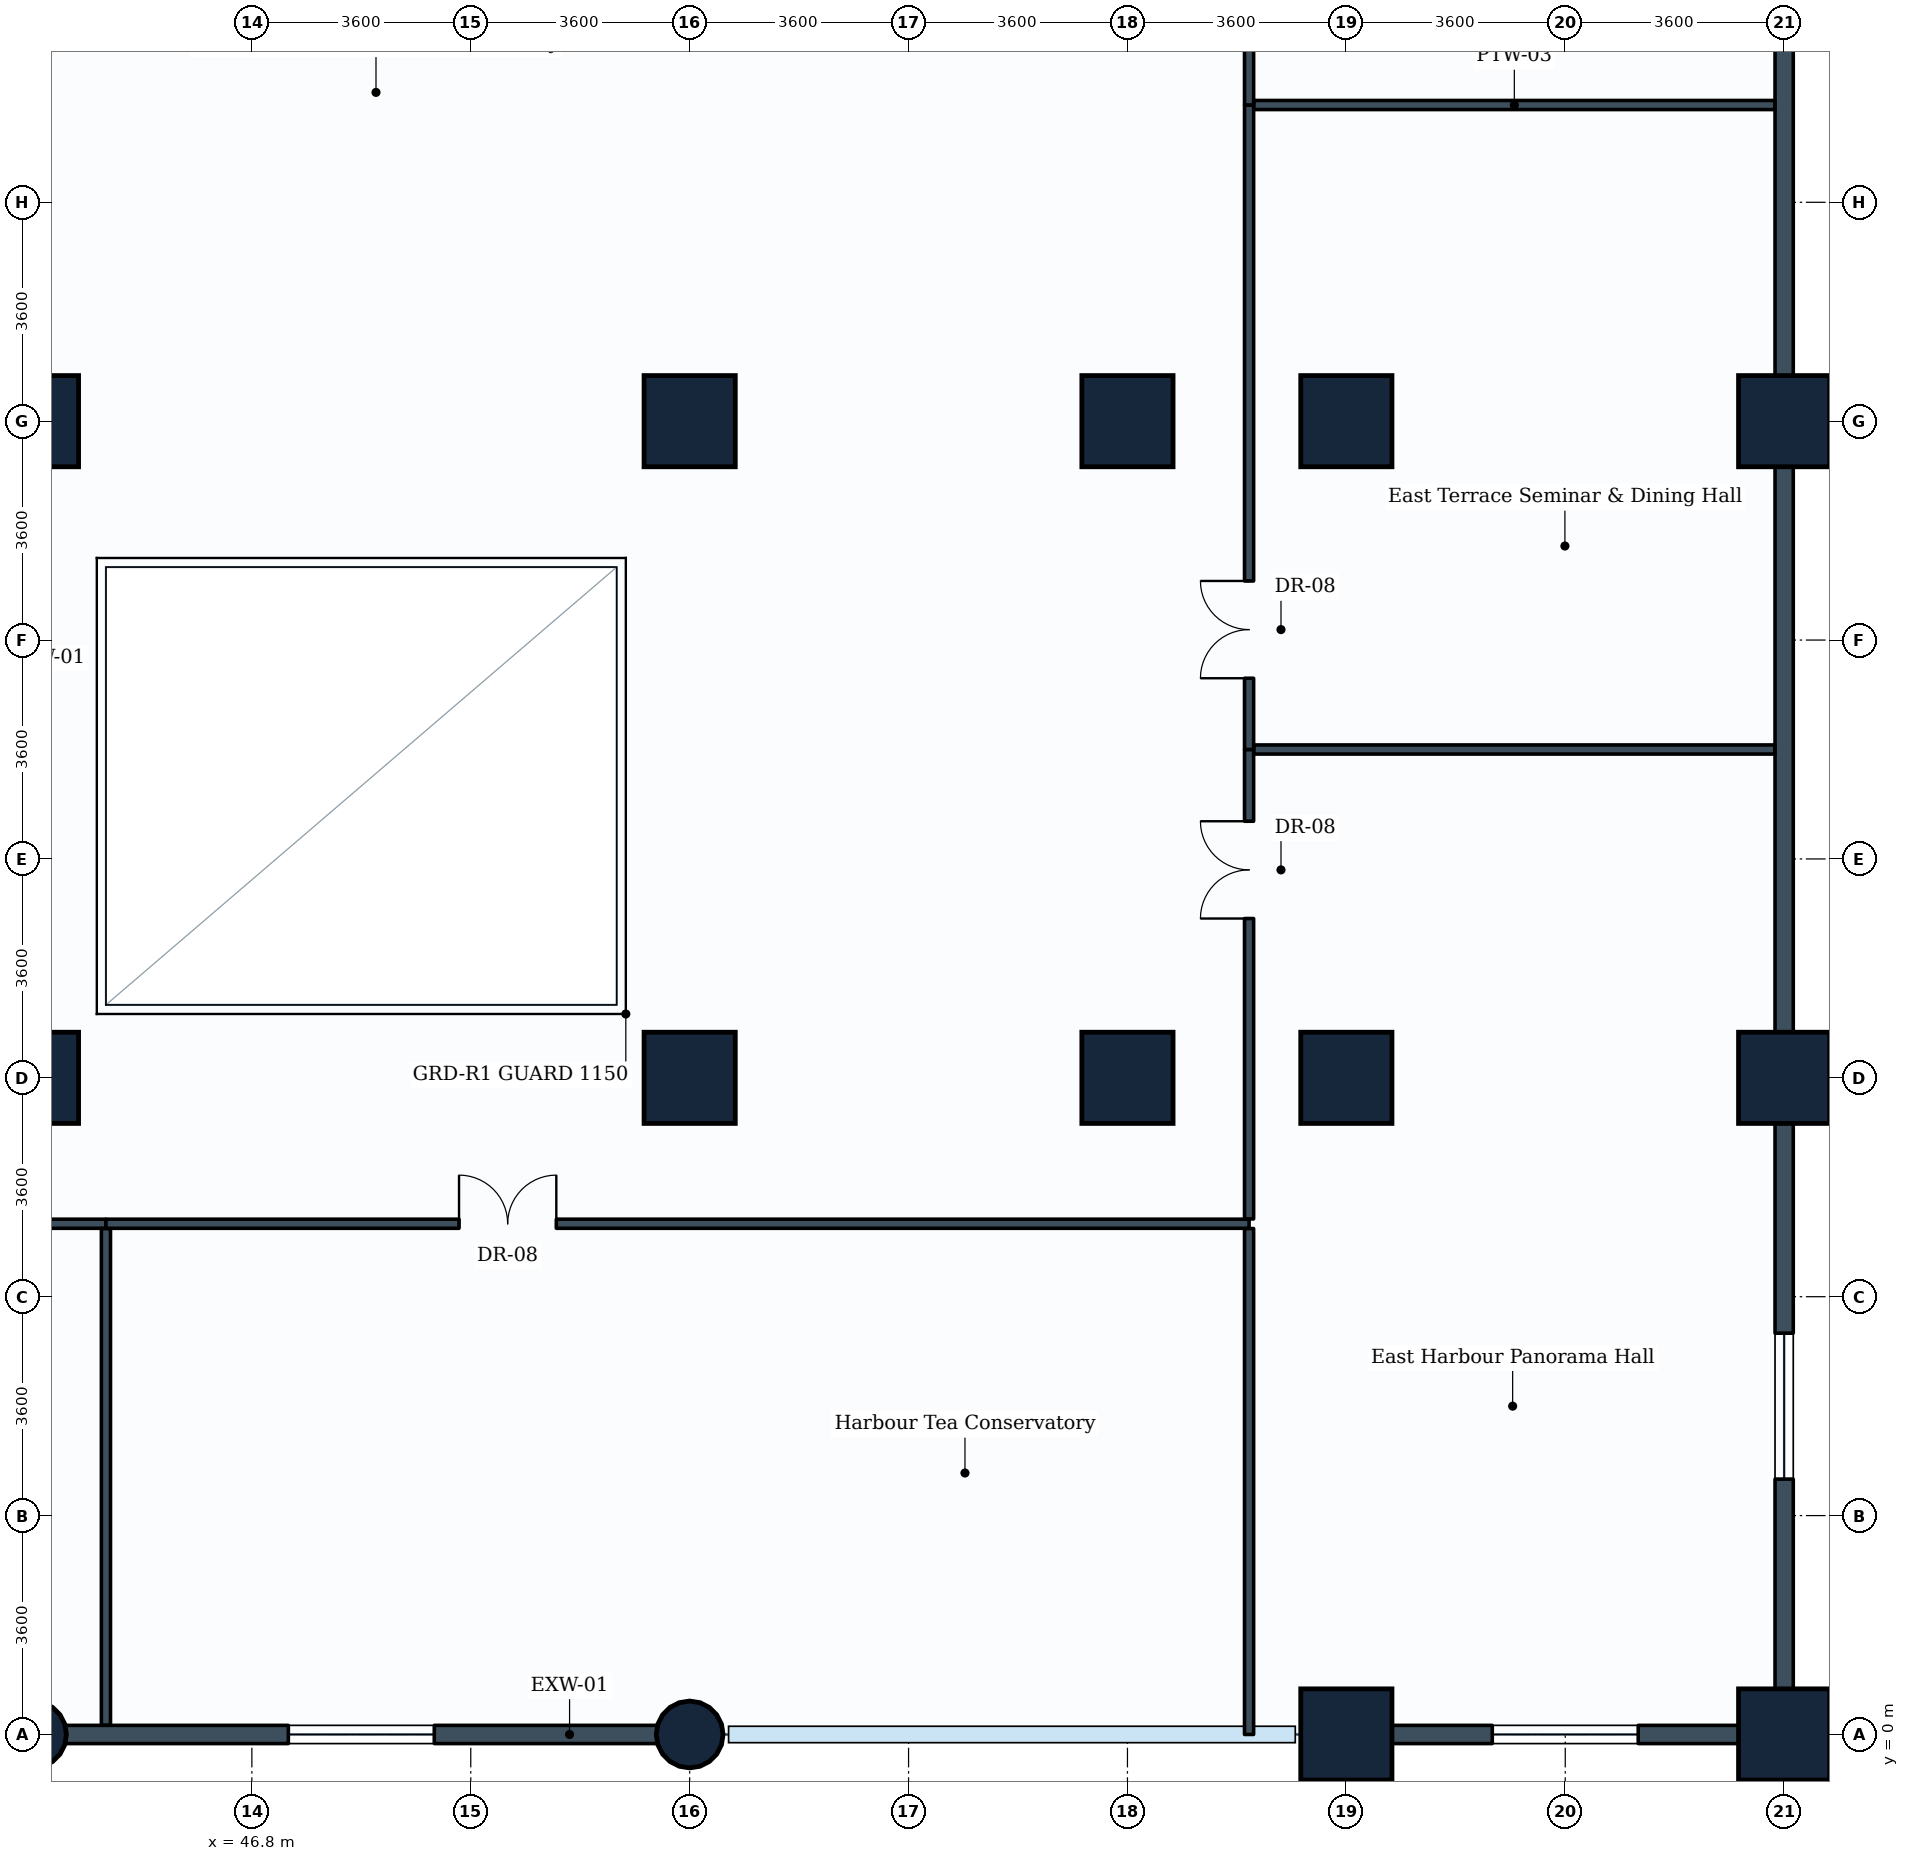
"""IFC4 building model, lengths in metres.
Left out: names, types, materials, properties, quantities, classifications, styles, units other than length and angle.
Written with IfcOpenShell. Run it as: python <this file> out.ifc"""

import sys

from ifc_helpers import new_model, si_unit, direction, frame, frame_2d, origin, origin_2d, place, context, subcontext, project, spatial, rectangle, circle, extrude, element, fill, save


model = new_model("IFC4")
c1 = context("Model", 3, precision=1e-05, world=origin(), true_north=direction((0.0, 1.0)))
c2 = subcontext(c1, "Body", "Model", "MODEL_VIEW")
j1 = project(units=[si_unit("LENGTHUNIT", "METRE"), si_unit("PLANEANGLEUNIT", "RADIAN")], contexts=[c1])
p1 = place(None, origin())
s1 = spatial("IfcSite", under=j1, at=p1, CompositionType="ELEMENT")
p2 = place(p1, origin())
s2 = spatial("IfcBuilding", under=s1, at=p2, CompositionType="ELEMENT")
p3 = place(p2, frame((0.0, 0.0, 10.2)))
s3 = spatial("IfcBuildingStorey", under=s2, at=p3, CompositionType="ELEMENT", Elevation=10.2)
p4 = place(p3, frame((43.2, 0.0, 0.0), z_axis=(0.0, 0.0, 1.0), x_axis=(1.0, 0.0, 0.0)))
e1 = element("IfcColumn", 1, at=p4, inside=s3, PredefinedType="COLUMN", context=c2, shape_type="SweptSolid", body=[
    extrude(circle(Radius=0.55, at=origin_2d()), origin(), (0.0, 0.0, 1.0), 4.6),
])
for number, where, z_axis, x_axis in (
    (2, (43.2, 10.8, 0.0), (0.0, 0.0, 1.0), (1.0, 0.0, 0.0)),
    (3, (43.2, 21.6, 0.0), (0.0, 0.0, 1.0), (1.0, 0.0, 0.0)),
):
    element("IfcColumn", number, at=place(p3, frame(where, z_axis=z_axis, x_axis=x_axis)), inside=s3, PredefinedType="COLUMN", context=c2, shape_type="SweptSolid", body=[
        extrude(rectangle(XDim=1.5, YDim=1.5, at=origin_2d()), origin(), (0.0, 0.0, 1.0), 4.6),
    ])
p5 = place(p3, frame((54.0, 0.0, 0.0), z_axis=(0.0, 0.0, 1.0), x_axis=(1.0, 0.0, 0.0)))
e4 = element("IfcColumn", 4, at=p5, inside=s3, PredefinedType="COLUMN", context=c2, shape_type="SweptSolid", body=[
    extrude(circle(Radius=0.55, at=origin_2d()), origin(), (0.0, 0.0, 1.0), 4.6),
])
for number, where, z_axis, x_axis in (
    (5, (54.0, 10.8, 0.0), (0.0, 0.0, 1.0), (1.0, 0.0, 0.0)),
    (6, (54.0, 21.6, 0.0), (0.0, 0.0, 1.0), (1.0, 0.0, 0.0)),
    (7, (61.2, 10.8, 0.0), (0.0, 0.0, 1.0), (1.0, 0.0, 0.0)),
    (8, (61.2, 21.6, 0.0), (0.0, 0.0, 1.0), (1.0, 0.0, 0.0)),
    (9, (64.8, 0.0, 0.0), (0.0, 0.0, 1.0), (1.0, 0.0, 0.0)),
    (10, (64.8, 10.8, 0.0), (0.0, 0.0, 1.0), (1.0, 0.0, 0.0)),
    (11, (64.8, 21.6, 0.0), (0.0, 0.0, 1.0), (1.0, 0.0, 0.0)),
    (12, (72.0, 0.0, 0.0), (0.0, 0.0, 1.0), (1.0, 0.0, 0.0)),
    (13, (72.0, 10.8, 0.0), (0.0, 0.0, 1.0), (1.0, 0.0, 0.0)),
    (14, (72.0, 21.6, 0.0), (0.0, 0.0, 1.0), (1.0, 0.0, 0.0)),
):
    element("IfcColumn", number, at=place(p3, frame(where, z_axis=z_axis, x_axis=x_axis)), inside=s3, PredefinedType="COLUMN", context=c2, shape_type="SweptSolid", body=[
        extrude(rectangle(XDim=1.5, YDim=1.5, at=origin_2d()), origin(), (0.0, 0.0, 1.0), 4.6),
    ])
p6 = place(p3, frame((54.0, 0.0, 0.0), z_axis=(0.0, 0.0, 1.0), x_axis=(-1.0, 0.0, 0.0)))
e15 = element("IfcWall", 15, at=p6, inside=s3, PredefinedType="STANDARD", context=c2, shape_type="SweptSolid", body=[
    extrude(rectangle(XDim=10.8, YDim=0.3, at=frame_2d((5.4, 0.0))), origin(), (0.0, 0.0, 1.0), 3.23),
])
p7 = place(p6, frame((4.2, 0.0, 0.85)))
e16 = element("IfcOpeningElement", 16, at=p7, cuts=e15, PredefinedType="OPENING", context=c2, shape_type="SweptSolid", body=[
    extrude(rectangle(XDim=2.4, YDim=1.6, at=frame_2d((1.2, 0.8))), frame((0.0, 0.16, 0.0), z_axis=(0.0, -1.0, 0.0), x_axis=(1.0, 0.0, 0.0)), (0.0, 0.0, 1.0), 0.32),
])
p8 = place(p3, frame((72.0, 0.0, 0.0), z_axis=(0.0, 0.0, 1.0), x_axis=(-1.0, 0.0, 0.0)))
e17 = element("IfcWall", 17, at=p8, inside=s3, PredefinedType="STANDARD", context=c2, shape_type="SweptSolid", body=[
    extrude(rectangle(XDim=7.2, YDim=0.3, at=frame_2d((3.6, 0.0))), origin(), (0.0, 0.0, 1.0), 3.23),
])
p9 = place(p8, frame((2.4, 0.0, 0.85)))
e18 = element("IfcOpeningElement", 18, at=p9, cuts=e17, PredefinedType="OPENING", context=c2, shape_type="SweptSolid", body=[
    extrude(rectangle(XDim=2.4, YDim=1.6, at=frame_2d((1.2, 0.8))), frame((0.0, 0.16, 0.0), z_axis=(0.0, -1.0, 0.0), x_axis=(1.0, 0.0, 0.0)), (0.0, 0.0, 1.0), 0.32),
])
p10 = place(p3, frame((72.0, 10.8, 0.0), z_axis=(0.0, 0.0, 1.0), x_axis=(0.0, -1.0, 0.0)))
e19 = element("IfcWall", 19, at=p10, inside=s3, PredefinedType="STANDARD", context=c2, shape_type="SweptSolid", body=[
    extrude(rectangle(XDim=10.8, YDim=0.3, at=frame_2d((5.4, 0.0))), origin(), (0.0, 0.0, 1.0), 3.23),
])
p11 = place(p10, frame((4.2, 0.0, 0.85)))
e20 = element("IfcOpeningElement", 20, at=p11, cuts=e19, PredefinedType="OPENING", context=c2, shape_type="SweptSolid", body=[
    extrude(rectangle(XDim=2.4, YDim=1.6, at=frame_2d((1.2, 0.8))), frame((0.0, 0.16, 0.0), z_axis=(0.0, -1.0, 0.0), x_axis=(1.0, 0.0, 0.0)), (0.0, 0.0, 1.0), 0.32),
])
p12 = place(p3, frame((72.0, 21.6, 0.0), z_axis=(0.0, 0.0, 1.0), x_axis=(0.0, -1.0, 0.0)))
e21 = element("IfcWall", 21, at=p12, inside=s3, PredefinedType="STANDARD", context=c2, shape_type="SweptSolid", body=[
    extrude(rectangle(XDim=10.8, YDim=0.3, at=frame_2d((5.4, 0.0))), origin(), (0.0, 0.0, 1.0), 3.63),
])
p13 = place(p3, frame((72.0, 32.4, 0.0), z_axis=(0.0, 0.0, 1.0), x_axis=(0.0, -1.0, 0.0)))
e22 = element("IfcWall", 22, at=p13, inside=s3, PredefinedType="STANDARD", context=c2, shape_type="SweptSolid", body=[
    extrude(rectangle(XDim=10.8, YDim=0.3, at=frame_2d((5.4, 0.0))), origin(), (0.0, 0.0, 1.0), 3.63),
])
p14 = place(p3, frame((26.4, 8.4, 0.0), z_axis=(0.0, 0.0, 1.0), x_axis=(1.0, 0.0, 0.0)))
e23 = element("IfcWall", 23, at=p14, inside=s3, PredefinedType="PARTITIONING", context=c2, shape_type="SweptSolid", body=[
    extrude(rectangle(XDim=18.0, YDim=0.15, at=frame_2d((9.0, 0.0))), origin(), (0.0, 0.0, 1.0), 3.23),
])
p15 = place(p14, frame((8.2, 0.0, 0.0)))
e24 = element("IfcOpeningElement", 24, at=p15, cuts=e23, PredefinedType="OPENING", context=c2, shape_type="SweptSolid", body=[
    extrude(rectangle(XDim=1.6, YDim=2.2, at=frame_2d((0.8, 1.1))), frame((0.0, 0.085, 0.0), z_axis=(0.0, -1.0, 0.0), x_axis=(1.0, 0.0, 0.0)), (0.0, 0.0, 1.0), 0.17),
])
p16 = place(p3, frame((44.4, 0.154, 0.0), z_axis=(0.0, 0.0, 1.0), x_axis=(0.0, 1.0, 0.0)))
e25 = element("IfcWall", 25, at=p16, inside=s3, PredefinedType="PARTITIONING", context=c2, shape_type="SweptSolid", body=[
    extrude(rectangle(XDim=8.167, YDim=0.15, at=frame_2d((4.083, 0.0))), origin(), (0.0, 0.0, 1.0), 4.285),
])
p17 = place(p3, frame((44.4, 8.4, 0.0), z_axis=(0.0, 0.0, 1.0), x_axis=(1.0, 0.0, 0.0)))
e26 = element("IfcWall", 26, at=p17, inside=s3, PredefinedType="PARTITIONING", context=c2, shape_type="SweptSolid", body=[
    extrude(rectangle(XDim=18.8, YDim=0.15, at=frame_2d((9.4, 0.0))), origin(), (0.0, 0.0, 1.0), 3.23),
])
p18 = place(p17, frame((5.807, 0.0, 0.0)))
e27 = element("IfcOpeningElement", 27, at=p18, cuts=e26, PredefinedType="OPENING", context=c2, shape_type="SweptSolid", body=[
    extrude(rectangle(XDim=1.6, YDim=2.2, at=frame_2d((0.8, 1.1))), frame((0.0, 0.085, 0.0), z_axis=(0.0, -1.0, 0.0), x_axis=(1.0, 0.0, 0.0)), (0.0, 0.0, 1.0), 0.17),
])
p19 = place(p3, frame((63.2, 0.0, 0.0), z_axis=(0.0, 0.0, 1.0), x_axis=(0.0, 1.0, 0.0)))
e28 = element("IfcWall", 28, at=p19, inside=s3, PredefinedType="PARTITIONING", context=c2, shape_type="SweptSolid", body=[
    extrude(rectangle(XDim=8.321, YDim=0.15, at=frame_2d((4.161, 0.0))), origin(), (0.0, 0.0, 1.0), 3.83),
])
p20 = place(p3, frame((63.2, 8.479, 0.0), z_axis=(0.0, 0.0, 1.0), x_axis=(0.0, 1.0, 0.0)))
e29 = element("IfcWall", 29, at=p20, inside=s3, PredefinedType="PARTITIONING", context=c2, shape_type="SweptSolid", body=[
    extrude(rectangle(XDim=7.721, YDim=0.15, at=frame_2d((3.86, 0.0))), origin(), (0.0, 0.0, 1.0), 3.63),
])
p21 = place(p20, frame((4.941, 0.0, 0.0)))
e30 = element("IfcOpeningElement", 30, at=p21, cuts=e29, PredefinedType="OPENING", context=c2, shape_type="SweptSolid", body=[
    extrude(rectangle(XDim=1.6, YDim=2.2, at=frame_2d((0.8, 1.1))), frame((0.0, 0.085, 0.0), z_axis=(0.0, -1.0, 0.0), x_axis=(1.0, 0.0, 0.0)), (0.0, 0.0, 1.0), 0.17),
])
p22 = place(p3, frame((63.279, 16.2, 0.0), z_axis=(0.0, 0.0, 1.0), x_axis=(1.0, 0.0, 0.0)))
e31 = element("IfcWall", 31, at=p22, inside=s3, PredefinedType="PARTITIONING", context=c2, shape_type="SweptSolid", body=[
    extrude(rectangle(XDim=8.567, YDim=0.15, at=frame_2d((4.283, 0.0))), origin(), (0.0, 0.0, 1.0), 3.63),
])
p23 = place(p3, frame((63.2, 16.2, 0.0), z_axis=(0.0, 0.0, 1.0), x_axis=(0.0, 1.0, 0.0)))
e32 = element("IfcWall", 32, at=p23, inside=s3, PredefinedType="PARTITIONING", context=c2, shape_type="SweptSolid", body=[
    extrude(rectangle(XDim=10.6, YDim=0.15, at=frame_2d((5.3, 0.0))), origin(), (0.0, 0.0, 1.0), 3.63),
])
p24 = place(p23, frame((1.172, 0.0, 0.0)))
e33 = element("IfcOpeningElement", 33, at=p24, cuts=e32, PredefinedType="OPENING", context=c2, shape_type="SweptSolid", body=[
    extrude(rectangle(XDim=1.6, YDim=2.2, at=frame_2d((0.8, 1.1))), frame((0.0, 0.085, 0.0), z_axis=(0.0, -1.0, 0.0), x_axis=(1.0, 0.0, 0.0)), (0.0, 0.0, 1.0), 0.17),
])
p25 = place(p3, frame((63.279, 26.8, 0.0), z_axis=(0.0, 0.0, 1.0), x_axis=(1.0, 0.0, 0.0)))
e34 = element("IfcWall", 34, at=p25, inside=s3, PredefinedType="PARTITIONING", context=c2, shape_type="SweptSolid", body=[
    extrude(rectangle(XDim=8.567, YDim=0.15, at=frame_2d((4.283, 0.0))), origin(), (0.0, 0.0, 1.0), 3.63),
])
p26 = place(p3, frame((63.2, 26.8, 0.0), z_axis=(0.0, 0.0, 1.0), x_axis=(0.0, 1.0, 0.0)))
e35 = element("IfcWall", 35, at=p26, inside=s3, PredefinedType="PARTITIONING", context=c2, shape_type="SweptSolid", body=[
    extrude(rectangle(XDim=6.0, YDim=0.15, at=frame_2d((3.0, 0.0))), origin(), (0.0, 0.0, 1.0), 3.63),
])
p27 = place(p26, frame((1.721, 0.0, 0.0)))
e36 = element("IfcOpeningElement", 36, at=p27, cuts=e35, PredefinedType="OPENING", context=c2, shape_type="SweptSolid", body=[
    extrude(rectangle(XDim=0.9, YDim=2.1, at=frame_2d((0.45, 1.05))), frame((0.0, 0.085, 0.0), z_axis=(0.0, -1.0, 0.0), x_axis=(1.0, 0.0, 0.0)), (0.0, 0.0, 1.0), 0.17),
])
p28 = place(p7, origin())
e37 = element("IfcWindow", 37, at=p28, inside=s3, PartitioningType="SINGLE_PANEL", PredefinedType="WINDOW", context=c2, shape_type="SweptSolid", body=[
    extrude(rectangle(XDim=2.4, YDim=1.6, at=frame_2d((1.2, 0.8))), frame((0.0, 0.03, 0.0), z_axis=(0.0, -1.0, 0.0), x_axis=(1.0, 0.0, 0.0)), (0.0, 0.0, 1.0), 0.06),
])
fill(e16, e37)
p29 = place(p9, origin())
e38 = element("IfcWindow", 38, at=p29, inside=s3, PartitioningType="SINGLE_PANEL", PredefinedType="WINDOW", context=c2, shape_type="SweptSolid", body=[
    extrude(rectangle(XDim=2.4, YDim=1.6, at=frame_2d((1.2, 0.8))), frame((0.0, 0.03, 0.0), z_axis=(0.0, -1.0, 0.0), x_axis=(1.0, 0.0, 0.0)), (0.0, 0.0, 1.0), 0.06),
])
fill(e18, e38)
p30 = place(p11, origin())
e39 = element("IfcWindow", 39, at=p30, inside=s3, PartitioningType="SINGLE_PANEL", PredefinedType="WINDOW", context=c2, shape_type="SweptSolid", body=[
    extrude(rectangle(XDim=2.4, YDim=1.6, at=frame_2d((1.2, 0.8))), frame((0.0, 0.03, 0.0), z_axis=(0.0, -1.0, 0.0), x_axis=(1.0, 0.0, 0.0)), (0.0, 0.0, 1.0), 0.06),
])
fill(e20, e39)
p31 = place(p18, origin())
e40 = element("IfcDoor", 40, at=p31, inside=s3, OperationType="DOUBLE_DOOR_SINGLE_SWING", PredefinedType="DOOR", context=c2, shape_type="SweptSolid", body=[
    extrude(rectangle(XDim=1.6, YDim=2.2, at=frame_2d((0.8, 1.1))), frame((0.0, 0.025, 0.0), z_axis=(0.0, -1.0, 0.0), x_axis=(1.0, 0.0, 0.0)), (0.0, 0.0, 1.0), 0.05),
])
fill(e27, e40)
p32 = place(p21, origin())
e41 = element("IfcDoor", 41, at=p32, inside=s3, OperationType="DOUBLE_DOOR_SINGLE_SWING", PredefinedType="DOOR", context=c2, shape_type="SweptSolid", body=[
    extrude(rectangle(XDim=1.6, YDim=2.2, at=frame_2d((0.8, 1.1))), frame((0.0, 0.025, 0.0), z_axis=(0.0, -1.0, 0.0), x_axis=(1.0, 0.0, 0.0)), (0.0, 0.0, 1.0), 0.05),
])
fill(e30, e41)
p33 = place(p24, origin())
e42 = element("IfcDoor", 42, at=p33, inside=s3, OperationType="DOUBLE_DOOR_SINGLE_SWING", PredefinedType="DOOR", context=c2, shape_type="SweptSolid", body=[
    extrude(rectangle(XDim=1.6, YDim=2.2, at=frame_2d((0.8, 1.1))), frame((0.0, 0.025, 0.0), z_axis=(0.0, -1.0, 0.0), x_axis=(1.0, 0.0, 0.0)), (0.0, 0.0, 1.0), 0.05),
])
fill(e33, e42)
save(model, sys.argv[1])
